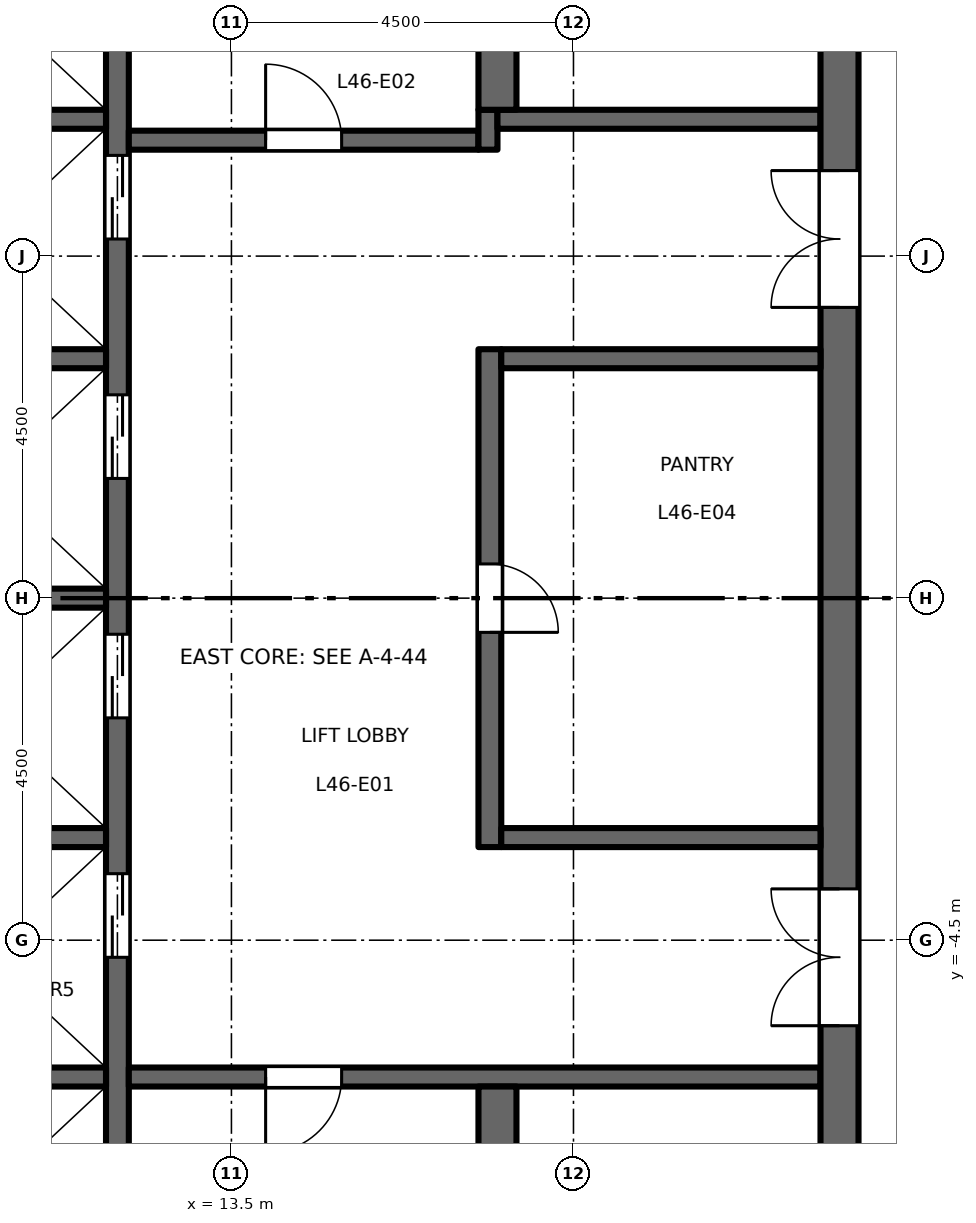
"""IFC4 building model, lengths in metres.
Left out: names, types, materials, properties, quantities, classifications, styles, units other than length and angle.
Written with IfcOpenShell. Run it as: python <this file> out.ifc"""

import sys

from ifc_helpers import new_model, si_unit, direction, frame, frame_2d, origin, place, context, subcontext, project, spatial, rectangle, extrude, element, fill, save


model = new_model("IFC4")
c1 = context("Model", 3, precision=1e-05, world=origin(), true_north=direction((0.0, 1.0)))
c2 = subcontext(c1, "Body", "Model", "MODEL_VIEW")
j1 = project(units=[si_unit("LENGTHUNIT", "METRE"), si_unit("PLANEANGLEUNIT", "RADIAN")], contexts=[c1])
p1 = place(None, origin())
s1 = spatial("IfcSite", under=j1, at=p1, CompositionType="ELEMENT")
p2 = place(p1, origin())
s2 = spatial("IfcBuilding", under=s1, at=p2, CompositionType="ELEMENT")
p3 = place(p2, frame((0.0, 0.0, 215.2)))
s3 = spatial("IfcBuildingStorey", under=s2, at=p3, CompositionType="ELEMENT", Elevation=215.2)
p4 = place(p3, frame((12.0, -9.45, 0.0), z_axis=(0.0, 0.0, 1.0), x_axis=(0.0, 1.0, 0.0)))
e1 = element("IfcWall", 1, at=p4, inside=s3, PredefinedType="SHEAR", context=c2, shape_type="SweptSolid", body=[
    extrude(rectangle(XDim=18.9, YDim=0.3, at=frame_2d((9.45, 0.0))), origin(), (0.0, 0.0, 1.0), 4.35),
])
p5 = place(p4, frame((4.725, 0.0, 0.0)))
e2 = element("IfcOpeningElement", 2, at=p5, cuts=e1, PredefinedType="OPENING", context=c2, shape_type="SweptSolid", body=[
    extrude(rectangle(XDim=1.1, YDim=2.1, at=frame_2d((0.55, 1.05))), frame((0.0, 0.16, 0.0), z_axis=(0.0, -1.0, 0.0), x_axis=(1.0, 0.0, 0.0)), (0.0, 0.0, 1.0), 0.32),
])
p6 = place(p4, frame((7.875, 0.0, 0.0)))
e3 = element("IfcOpeningElement", 3, at=p6, cuts=e1, PredefinedType="OPENING", context=c2, shape_type="SweptSolid", body=[
    extrude(rectangle(XDim=1.1, YDim=2.1, at=frame_2d((0.55, 1.05))), frame((0.0, 0.16, 0.0), z_axis=(0.0, -1.0, 0.0), x_axis=(1.0, 0.0, 0.0)), (0.0, 0.0, 1.0), 0.32),
])
p7 = place(p4, frame((11.025, 0.0, 0.0)))
e4 = element("IfcOpeningElement", 4, at=p7, cuts=e1, PredefinedType="OPENING", context=c2, shape_type="SweptSolid", body=[
    extrude(rectangle(XDim=1.1, YDim=2.1, at=frame_2d((0.55, 1.05))), frame((0.0, 0.16, 0.0), z_axis=(0.0, -1.0, 0.0), x_axis=(1.0, 0.0, 0.0)), (0.0, 0.0, 1.0), 0.32),
])
p8 = place(p4, frame((14.175, 0.0, 0.0)))
e5 = element("IfcOpeningElement", 5, at=p8, cuts=e1, PredefinedType="OPENING", context=c2, shape_type="SweptSolid", body=[
    extrude(rectangle(XDim=1.1, YDim=2.1, at=frame_2d((0.55, 1.05))), frame((0.0, 0.16, 0.0), z_axis=(0.0, -1.0, 0.0), x_axis=(1.0, 0.0, 0.0)), (0.0, 0.0, 1.0), 0.32),
])
p9 = place(p4, frame((16.725, 0.0, 0.0)))
e6 = element("IfcOpeningElement", 6, at=p9, cuts=e1, PredefinedType="OPENING", context=c2, shape_type="SweptSolid", body=[
    extrude(rectangle(XDim=1.2, YDim=2.1, at=frame_2d((0.6, 1.05))), frame((0.0, 0.16, 0.0), z_axis=(0.0, -1.0, 0.0), x_axis=(1.0, 0.0, 0.0)), (0.0, 0.0, 1.0), 0.32),
])
p10 = place(p4, frame((0.975, 0.0, 0.0)))
e7 = element("IfcOpeningElement", 7, at=p10, cuts=e1, PredefinedType="OPENING", context=c2, shape_type="SweptSolid", body=[
    extrude(rectangle(XDim=1.2, YDim=2.1, at=frame_2d((0.6, 1.05))), frame((0.0, 0.16, 0.0), z_axis=(0.0, -1.0, 0.0), x_axis=(1.0, 0.0, 0.0)), (0.0, 0.0, 1.0), 0.32),
])
p11 = place(p3, frame((12.15, 6.025, 0.0), z_axis=(0.0, 0.0, 1.0), x_axis=(1.0, 0.0, 0.0)))
e8 = element("IfcWall", 8, at=p11, inside=s3, PredefinedType="SHEAR", context=c2, shape_type="SweptSolid", body=[
    extrude(rectangle(XDim=4.6, YDim=0.25, at=frame_2d((2.3, 0.0))), origin(), (0.0, 0.0, 1.0), 4.35),
])
p12 = place(p11, frame((1.8, 0.0, 0.0)))
e9 = element("IfcOpeningElement", 9, at=p12, cuts=e8, PredefinedType="OPENING", context=c2, shape_type="SweptSolid", body=[
    extrude(rectangle(XDim=1.0, YDim=2.1, at=frame_2d((0.5, 1.05))), frame((0.0, 0.135, 0.0), z_axis=(0.0, -1.0, 0.0), x_axis=(1.0, 0.0, 0.0)), (0.0, 0.0, 1.0), 0.27),
])
p13 = place(p3, frame((16.875, 5.9, 0.0), z_axis=(0.0, 0.0, 1.0), x_axis=(0.0, 1.0, 0.0)))
e10 = element("IfcWall", 10, at=p13, inside=s3, PredefinedType="SHEAR", context=c2, shape_type="SweptSolid", body=[
    extrude(rectangle(XDim=0.525, YDim=0.25, at=frame_2d((0.263, 0.0))), origin(), (0.0, 0.0, 1.0), 4.35),
])
p14 = place(p3, frame((17.0, 6.3, 0.0), z_axis=(0.0, 0.0, 1.0), x_axis=(1.0, 0.0, 0.0)))
e11 = element("IfcWall", 11, at=p14, inside=s3, PredefinedType="SHEAR", context=c2, shape_type="SweptSolid", body=[
    extrude(rectangle(XDim=4.25, YDim=0.25, at=frame_2d((2.125, 0.0))), origin(), (0.0, 0.0, 1.0), 4.35),
])
p15 = place(p3, frame((12.15, -6.3, 0.0), z_axis=(0.0, 0.0, 1.0), x_axis=(1.0, 0.0, 0.0)))
e12 = element("IfcWall", 12, at=p15, inside=s3, PredefinedType="SHEAR", context=c2, shape_type="SweptSolid", body=[
    extrude(rectangle(XDim=9.1, YDim=0.25, at=frame_2d((4.55, 0.0))), origin(), (0.0, 0.0, 1.0), 4.35),
])
p16 = place(p15, frame((1.8, 0.0, 0.0)))
e13 = element("IfcOpeningElement", 13, at=p16, cuts=e12, PredefinedType="OPENING", context=c2, shape_type="SweptSolid", body=[
    extrude(rectangle(XDim=1.0, YDim=2.1, at=frame_2d((0.5, 1.05))), frame((0.0, 0.135, 0.0), z_axis=(0.0, -1.0, 0.0), x_axis=(1.0, 0.0, 0.0)), (0.0, 0.0, 1.0), 0.27),
])
p17 = place(p3, frame((21.5, -13.0, 0.0), z_axis=(0.0, 0.0, 1.0), x_axis=(0.0, 1.0, 0.0)))
e14 = element("IfcWall", 14, at=p17, inside=s3, PredefinedType="SHEAR", context=c2, shape_type="SweptSolid", body=[
    extrude(rectangle(XDim=26.0, YDim=0.5, at=frame_2d((13.0, 0.0))), origin(), (0.0, 0.0, 1.0), 4.35),
])
p18 = place(p17, frame((16.825, 0.0, 0.0)))
e15 = element("IfcOpeningElement", 15, at=p18, cuts=e14, PredefinedType="OPENING", context=c2, shape_type="SweptSolid", body=[
    extrude(rectangle(XDim=1.8, YDim=2.1, at=frame_2d((0.9, 1.05))), frame((0.0, 0.26, 0.0), z_axis=(0.0, -1.0, 0.0), x_axis=(1.0, 0.0, 0.0)), (0.0, 0.0, 1.0), 0.52),
])
p19 = place(p17, frame((7.375, 0.0, 0.0)))
e16 = element("IfcOpeningElement", 16, at=p19, cuts=e14, PredefinedType="OPENING", context=c2, shape_type="SweptSolid", body=[
    extrude(rectangle(XDim=1.8, YDim=2.1, at=frame_2d((0.9, 1.05))), frame((0.0, 0.26, 0.0), z_axis=(0.0, -1.0, 0.0), x_axis=(1.0, 0.0, 0.0)), (0.0, 0.0, 1.0), 0.52),
])
p20 = place(p3, frame((16.9, -3.275, 0.0), z_axis=(0.0, 0.0, 1.0), x_axis=(0.0, 1.0, 0.0)))
e17 = element("IfcWall", 17, at=p20, inside=s3, PredefinedType="SHEAR", context=c2, shape_type="SweptSolid", body=[
    extrude(rectangle(XDim=6.55, YDim=0.3, at=frame_2d((3.275, 0.0))), origin(), (0.0, 0.0, 1.0), 4.35),
])
p21 = place(p20, frame((2.825, 0.0, 0.0)))
e18 = element("IfcOpeningElement", 18, at=p21, cuts=e17, PredefinedType="OPENING", context=c2, shape_type="SweptSolid", body=[
    extrude(rectangle(XDim=0.9, YDim=2.1, at=frame_2d((0.45, 1.05))), frame((0.0, 0.16, 0.0), z_axis=(0.0, -1.0, 0.0), x_axis=(1.0, 0.0, 0.0)), (0.0, 0.0, 1.0), 0.32),
])
for number, where, z_axis, x_axis in (
    (19, (17.05, 3.15, 0.0), (0.0, 0.0, 1.0), (1.0, 0.0, 0.0)),
    (20, (17.05, -3.15, 0.0), (0.0, 0.0, 1.0), (1.0, 0.0, 0.0)),
):
    element("IfcWall", number, at=place(p3, frame(where, z_axis=z_axis, x_axis=x_axis)), inside=s3, PredefinedType="SHEAR", context=c2, shape_type="SweptSolid", body=[
        extrude(rectangle(XDim=4.2, YDim=0.25, at=frame_2d((2.1, 0.0))), origin(), (0.0, 0.0, 1.0), 4.35),
    ])
for number, where, z_axis, x_axis in (
    (21, (17.0, 6.425, 0.0), (0.0, 0.0, 1.0), (0.0, 1.0, 0.0)),
    (22, (17.0, -13.0, 0.0), (0.0, 0.0, 1.0), (0.0, 1.0, 0.0)),
):
    element("IfcWall", number, at=place(p3, frame(where, z_axis=z_axis, x_axis=x_axis)), inside=s3, PredefinedType="SHEAR", context=c2, shape_type="SweptSolid", body=[
        extrude(rectangle(XDim=6.575, YDim=0.5, at=frame_2d((3.288, 0.0))), origin(), (0.0, 0.0, 1.0), 4.35),
    ])
for number, where, z_axis, x_axis in (
    (23, (8.75, 0.0, 0.0), (0.0, 0.0, 1.0), (1.0, 0.0, 0.0)),
    (24, (8.75, 3.15, 0.0), (0.0, 0.0, 1.0), (1.0, 0.0, 0.0)),
    (25, (8.75, 6.3, 0.0), (0.0, 0.0, 1.0), (1.0, 0.0, 0.0)),
    (26, (8.75, -3.15, 0.0), (0.0, 0.0, 1.0), (1.0, 0.0, 0.0)),
    (27, (8.75, -6.3, 0.0), (0.0, 0.0, 1.0), (1.0, 0.0, 0.0)),
):
    element("IfcWall", number, at=place(p3, frame(where, z_axis=z_axis, x_axis=x_axis)), inside=s3, PredefinedType="SHEAR", context=c2, shape_type="SweptSolid", body=[
        extrude(rectangle(XDim=3.1, YDim=0.25, at=frame_2d((1.55, 0.0))), origin(), (0.0, 0.0, 1.0), 4.35),
    ])
p22 = place(p12, origin())
e28 = element("IfcDoor", 28, at=p22, inside=s3, OperationType="SINGLE_SWING_RIGHT", PredefinedType="DOOR", context=c2, shape_type="SweptSolid", body=[
    extrude(rectangle(XDim=1.0, YDim=2.1, at=frame_2d((0.5, 1.05))), frame((0.0, 0.025, 0.0), z_axis=(0.0, -1.0, 0.0), x_axis=(1.0, 0.0, 0.0)), (0.0, 0.0, 1.0), 0.05),
])
fill(e9, e28)
p23 = place(p16, origin())
e29 = element("IfcDoor", 29, at=p23, inside=s3, OperationType="SINGLE_SWING_LEFT", PredefinedType="DOOR", context=c2, shape_type="SweptSolid", body=[
    extrude(rectangle(XDim=1.0, YDim=2.1, at=frame_2d((0.5, 1.05))), frame((0.0, 0.025, 0.0), z_axis=(0.0, -1.0, 0.0), x_axis=(1.0, 0.0, 0.0)), (0.0, 0.0, 1.0), 0.05),
])
fill(e13, e29)
p24 = place(p18, origin())
e30 = element("IfcDoor", 30, at=p24, inside=s3, OperationType="DOUBLE_DOOR_DOUBLE_SWING", PredefinedType="DOOR", context=c2, shape_type="SweptSolid", body=[
    extrude(rectangle(XDim=1.8, YDim=2.1, at=frame_2d((0.9, 1.05))), frame((0.0, 0.025, 0.0), z_axis=(0.0, -1.0, 0.0), x_axis=(1.0, 0.0, 0.0)), (0.0, 0.0, 1.0), 0.05),
])
fill(e15, e30)
p25 = place(p19, origin())
e31 = element("IfcDoor", 31, at=p25, inside=s3, OperationType="DOUBLE_DOOR_DOUBLE_SWING", PredefinedType="DOOR", context=c2, shape_type="SweptSolid", body=[
    extrude(rectangle(XDim=1.8, YDim=2.1, at=frame_2d((0.9, 1.05))), frame((0.0, 0.025, 0.0), z_axis=(0.0, -1.0, 0.0), x_axis=(1.0, 0.0, 0.0)), (0.0, 0.0, 1.0), 0.05),
])
fill(e16, e31)
p26 = place(p5, origin())
e32 = element("IfcDoor", 32, at=p26, inside=s3, OperationType="DOUBLE_DOOR_SLIDING", PredefinedType="DOOR", context=c2, shape_type="SweptSolid", body=[
    extrude(rectangle(XDim=1.1, YDim=2.1, at=frame_2d((0.55, 1.05))), frame((0.0, 0.025, 0.0), z_axis=(0.0, -1.0, 0.0), x_axis=(1.0, 0.0, 0.0)), (0.0, 0.0, 1.0), 0.05),
])
fill(e2, e32)
p27 = place(p6, origin())
e33 = element("IfcDoor", 33, at=p27, inside=s3, OperationType="DOUBLE_DOOR_SLIDING", PredefinedType="DOOR", context=c2, shape_type="SweptSolid", body=[
    extrude(rectangle(XDim=1.1, YDim=2.1, at=frame_2d((0.55, 1.05))), frame((0.0, 0.025, 0.0), z_axis=(0.0, -1.0, 0.0), x_axis=(1.0, 0.0, 0.0)), (0.0, 0.0, 1.0), 0.05),
])
fill(e3, e33)
p28 = place(p7, origin())
e34 = element("IfcDoor", 34, at=p28, inside=s3, OperationType="DOUBLE_DOOR_SLIDING", PredefinedType="DOOR", context=c2, shape_type="SweptSolid", body=[
    extrude(rectangle(XDim=1.1, YDim=2.1, at=frame_2d((0.55, 1.05))), frame((0.0, 0.025, 0.0), z_axis=(0.0, -1.0, 0.0), x_axis=(1.0, 0.0, 0.0)), (0.0, 0.0, 1.0), 0.05),
])
fill(e4, e34)
p29 = place(p8, origin())
e35 = element("IfcDoor", 35, at=p29, inside=s3, OperationType="DOUBLE_DOOR_SLIDING", PredefinedType="DOOR", context=c2, shape_type="SweptSolid", body=[
    extrude(rectangle(XDim=1.1, YDim=2.1, at=frame_2d((0.55, 1.05))), frame((0.0, 0.025, 0.0), z_axis=(0.0, -1.0, 0.0), x_axis=(1.0, 0.0, 0.0)), (0.0, 0.0, 1.0), 0.05),
])
fill(e5, e35)
p30 = place(p21, origin())
e36 = element("IfcDoor", 36, at=p30, inside=s3, OperationType="SINGLE_SWING_LEFT", PredefinedType="DOOR", context=c2, shape_type="SweptSolid", body=[
    extrude(rectangle(XDim=0.9, YDim=2.1, at=frame_2d((0.45, 1.05))), frame((0.0, 0.025, 0.0), z_axis=(0.0, -1.0, 0.0), x_axis=(1.0, 0.0, 0.0)), (0.0, 0.0, 1.0), 0.05),
])
fill(e18, e36)
save(model, sys.argv[1])
